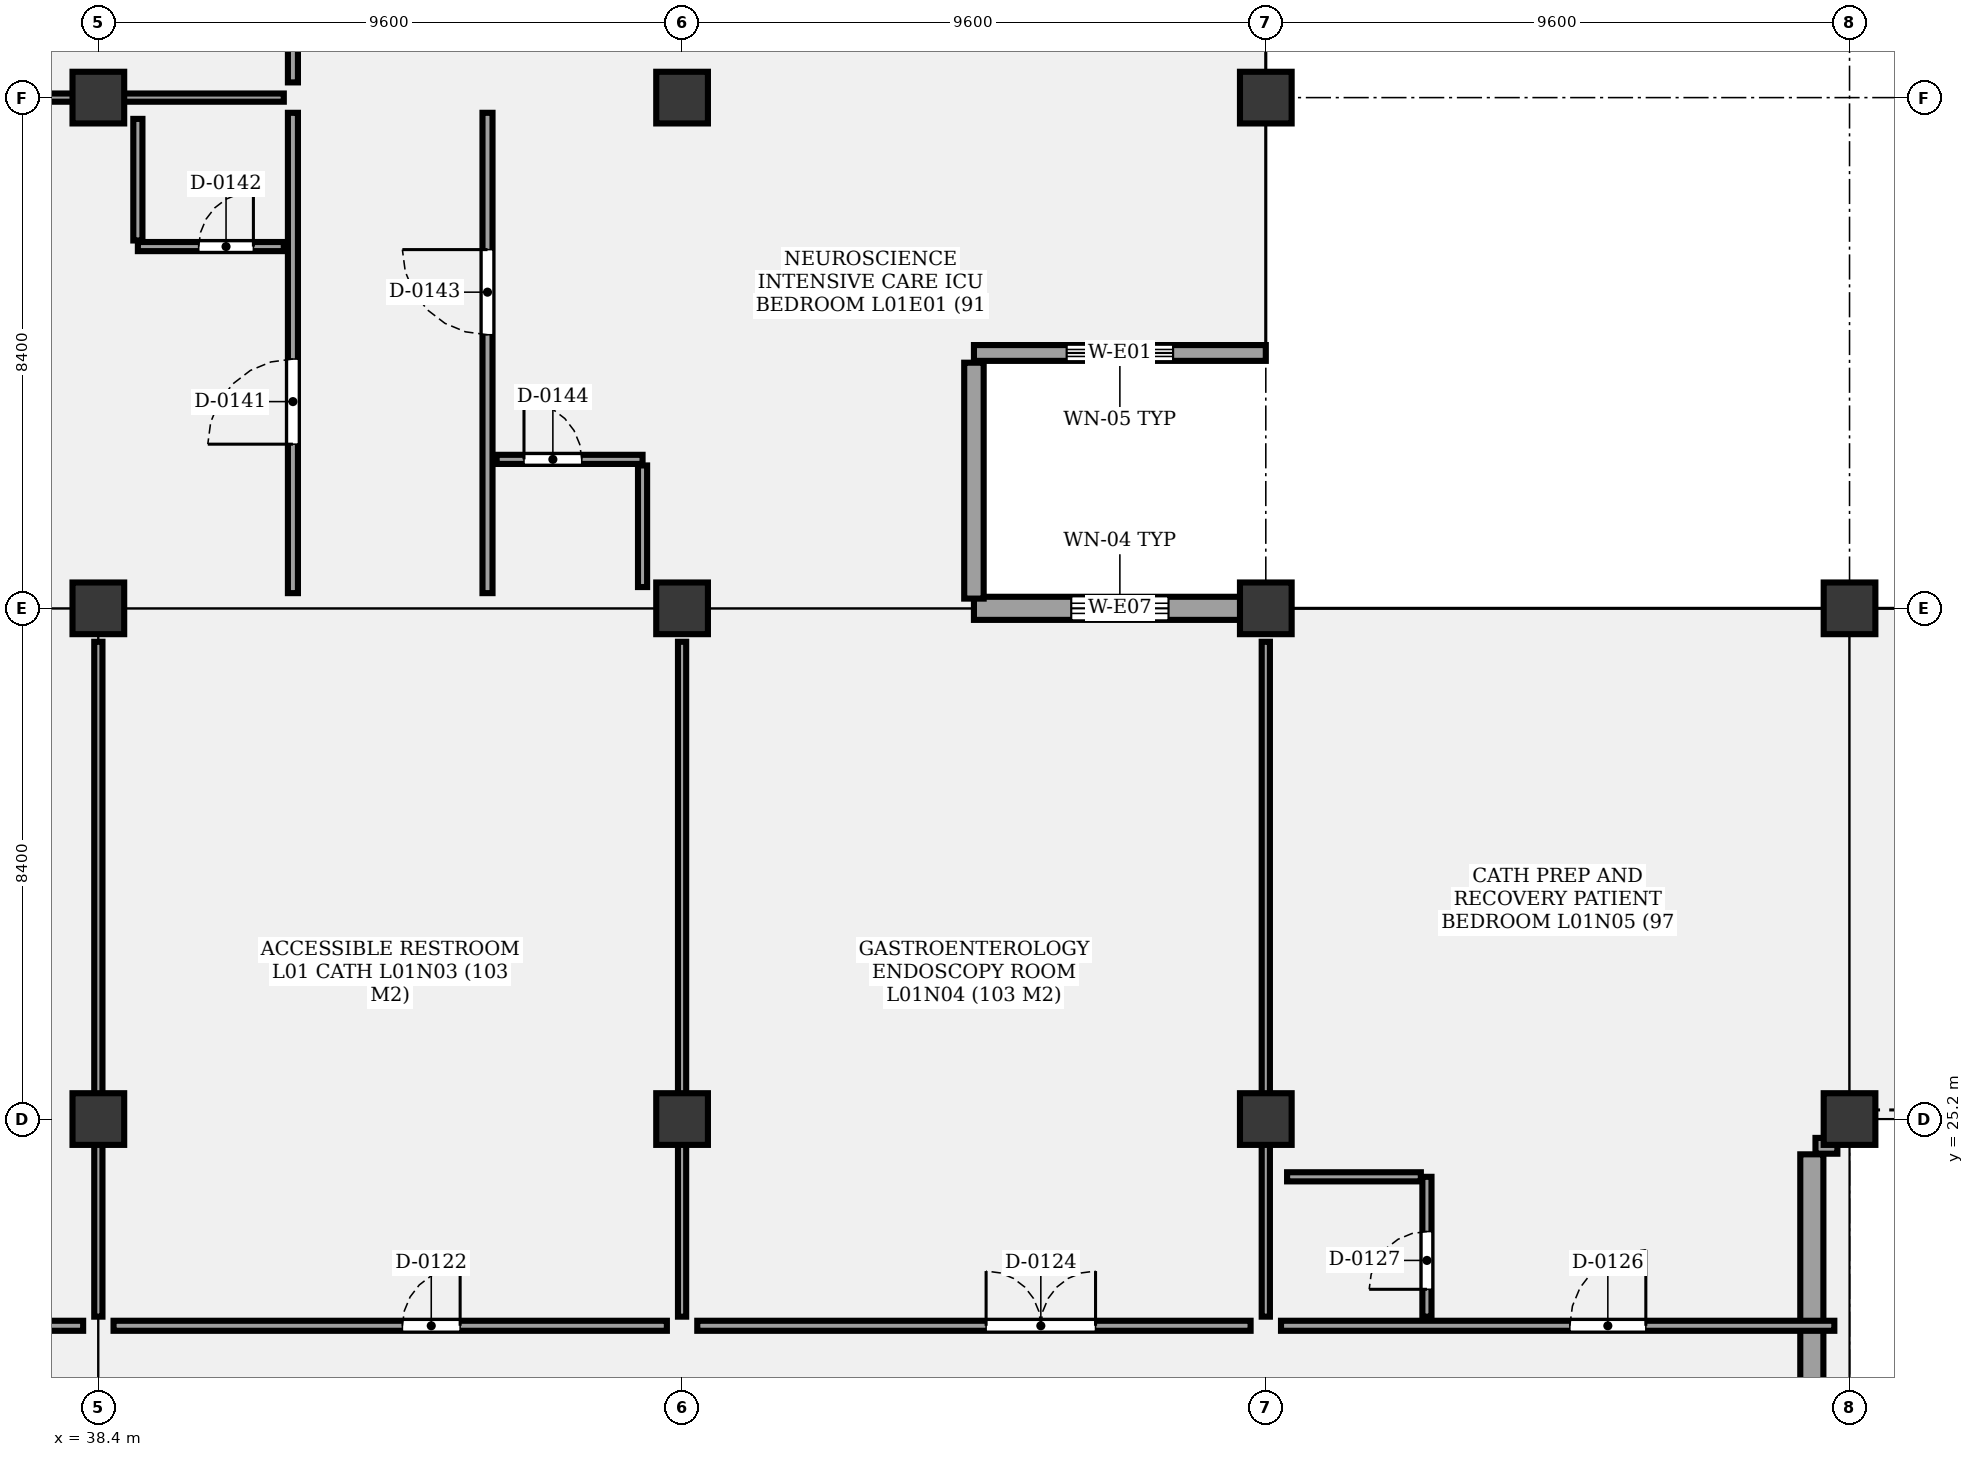
"""IFC4 building model, lengths in metres.
Left out: names, types, materials, properties, quantities, classifications, styles, units other than length and angle.
Written with IfcOpenShell. Run it as: python <this file> out.ifc"""

import sys

from ifc_helpers import new_model, si_unit, direction, frame, frame_2d, origin, origin_2d, place, context, subcontext, project, spatial, rectangle, extrude, element, fill, save


model = new_model("IFC4")
c1 = context("Model", 3, precision=1e-05, world=origin(), true_north=direction((0.0, 1.0)))
c2 = subcontext(c1, "Body", "Model", "MODEL_VIEW")
j1 = project(units=[si_unit("LENGTHUNIT", "METRE"), si_unit("PLANEANGLEUNIT", "RADIAN")], contexts=[c1])
p1 = place(None, origin())
s1 = spatial("IfcSite", under=j1, at=p1, CompositionType="ELEMENT")
p2 = place(p1, origin())
s2 = spatial("IfcBuilding", under=s1, at=p2, CompositionType="ELEMENT")
p3 = place(p2, frame((0.0, 0.0, 5.1)))
s3 = spatial("IfcBuildingStorey", under=s2, at=p3, CompositionType="ELEMENT", Elevation=5.1)
for number, where, z_axis, x_axis in (
    (1, (38.4, 25.2, 0.0), (0.0, 0.0, 1.0), (1.0, 0.0, 0.0)),
    (2, (38.4, 33.6, 0.0), (0.0, 0.0, 1.0), (1.0, 0.0, 0.0)),
    (3, (38.4, 42.0, 0.0), (0.0, 0.0, 1.0), (1.0, 0.0, 0.0)),
    (4, (48.0, 25.2, 0.0), (0.0, 0.0, 1.0), (1.0, 0.0, 0.0)),
    (5, (48.0, 33.6, 0.0), (0.0, 0.0, 1.0), (1.0, 0.0, 0.0)),
    (6, (48.0, 42.0, 0.0), (0.0, 0.0, 1.0), (1.0, 0.0, 0.0)),
    (7, (57.6, 25.2, 0.0), (0.0, 0.0, 1.0), (1.0, 0.0, 0.0)),
    (8, (57.6, 33.6, 0.0), (0.0, 0.0, 1.0), (1.0, 0.0, 0.0)),
    (9, (57.6, 42.0, 0.0), (0.0, 0.0, 1.0), (1.0, 0.0, 0.0)),
    (10, (67.2, 25.2, 0.0), (0.0, 0.0, 1.0), (1.0, 0.0, 0.0)),
    (11, (67.2, 33.6, 0.0), (0.0, 0.0, 1.0), (1.0, 0.0, 0.0)),
):
    element("IfcColumn", number, at=place(p3, frame(where, z_axis=z_axis, x_axis=x_axis)), inside=s3, PredefinedType="COLUMN", context=c2, shape_type="SweptSolid", body=[
        extrude(rectangle(XDim=0.85, YDim=0.85, at=origin_2d()), origin(), (0.0, 0.0, 1.0), 4.8),
    ])
p4 = place(p3, frame((52.8, 33.6, 0.0), z_axis=(0.0, 0.0, 1.0), x_axis=(1.0, 0.0, 0.0)))
e12 = element("IfcWall", 12, at=p4, inside=s3, PredefinedType="SOLIDWALL", context=c2, shape_type="SweptSolid", body=[
    extrude(rectangle(XDim=4.8, YDim=0.38, at=frame_2d((2.4, 0.0))), origin(), (0.0, 0.0, 1.0), 3.94),
])
p5 = place(p4, frame((1.6, 0.0, 0.85)))
e13 = element("IfcOpeningElement", 13, at=p5, cuts=e12, PredefinedType="OPENING", context=c2, shape_type="SweptSolid", body=[
    extrude(rectangle(XDim=1.6, YDim=1.2, at=frame_2d((0.8, 0.6))), frame((0.0, 0.2, 0.0), z_axis=(0.0, -1.0, 0.0), x_axis=(1.0, 0.0, 0.0)), (0.0, 0.0, 1.0), 0.4),
])
p6 = place(p3, frame((57.6, 37.8, 0.0), z_axis=(0.0, 0.0, 1.0), x_axis=(-1.0, 0.0, 0.0)))
e14 = element("IfcWall", 14, at=p6, inside=s3, PredefinedType="SOLIDWALL", context=c2, shape_type="SweptSolid", body=[
    extrude(rectangle(XDim=4.8, YDim=0.26, at=frame_2d((2.4, 0.0))), origin(), (0.0, 0.0, 1.0), 3.94),
])
p7 = place(p6, frame((1.525, 0.0, 0.85)))
e15 = element("IfcOpeningElement", 15, at=p7, cuts=e14, PredefinedType="OPENING", context=c2, shape_type="SweptSolid", body=[
    extrude(rectangle(XDim=1.75, YDim=1.2, at=frame_2d((0.875, 0.6))), frame((0.0, 0.14, 0.0), z_axis=(0.0, -1.0, 0.0), x_axis=(1.0, 0.0, 0.0)), (0.0, 0.0, 1.0), 0.28),
])
p8 = place(p3, frame((52.8, 37.64, 0.0), z_axis=(0.0, 0.0, 1.0), x_axis=(0.0, -1.0, 0.0)))
e16 = element("IfcWall", 16, at=p8, inside=s3, PredefinedType="SOLIDWALL", context=c2, shape_type="SweptSolid", body=[
    extrude(rectangle(XDim=3.88, YDim=0.32, at=frame_2d((1.94, 0.0))), origin(), (0.0, 0.0, 1.0), 3.94),
])
p9 = place(p3, frame((67.0, 24.76, 0.0), z_axis=(0.0, 0.0, 1.0), x_axis=(-1.0, 0.0, 0.0)))
e17 = element("IfcWall", 17, at=p9, inside=s3, PredefinedType="SOLIDWALL", context=c2, shape_type="SweptSolid", body=[
    extrude(rectangle(XDim=0.36, YDim=0.26, at=frame_2d((0.18, 0.0))), origin(), (0.0, 0.0, 1.0), 3.94),
])
p10 = place(p3, frame((66.58, 24.62, 0.0), z_axis=(0.0, 0.0, 1.0), x_axis=(0.0, -1.0, 0.0)))
e18 = element("IfcWall", 18, at=p10, inside=s3, PredefinedType="SOLIDWALL", context=c2, shape_type="SweptSolid", body=[
    extrude(rectangle(XDim=7.4, YDim=0.38, at=frame_2d((3.7, 0.0))), origin(), (0.0, 0.0, 1.0), 3.94),
])
p11 = place(p3, frame((29.05, 21.8, 0.0), z_axis=(0.0, 0.0, 1.0), x_axis=(1.0, 0.0, 0.0)))
e19 = element("IfcWall", 19, at=p11, inside=s3, PredefinedType="PARTITIONING", context=c2, shape_type="SweptSolid", body=[
    extrude(rectangle(XDim=9.1, YDim=0.165, at=frame_2d((4.55, 0.0))), origin(), (0.0, 0.0, 1.0), 3.68),
])
p12 = place(p11, frame((4.75, 0.0, 0.0)))
e20 = element("IfcOpeningElement", 20, at=p12, cuts=e19, PredefinedType="OPENING", context=c2, shape_type="SweptSolid", body=[
    extrude(rectangle(XDim=1.25, YDim=2.2, at=frame_2d((0.625, 1.1))), frame((0.0, 0.093, 0.0), z_axis=(0.0, -1.0, 0.0), x_axis=(1.0, 0.0, 0.0)), (0.0, 0.0, 1.0), 0.185),
])
p13 = place(p3, frame((38.65, 21.8, 0.0), z_axis=(0.0, 0.0, 1.0), x_axis=(1.0, 0.0, 0.0)))
e21 = element("IfcWall", 21, at=p13, inside=s3, PredefinedType="PARTITIONING", context=c2, shape_type="SweptSolid", body=[
    extrude(rectangle(XDim=9.1, YDim=0.165, at=frame_2d((4.55, 0.0))), origin(), (0.0, 0.0, 1.0), 3.68),
])
p14 = place(p13, frame((4.75, 0.0, 0.0)))
e22 = element("IfcOpeningElement", 22, at=p14, cuts=e21, PredefinedType="OPENING", context=c2, shape_type="SweptSolid", body=[
    extrude(rectangle(XDim=0.95, YDim=2.1, at=frame_2d((0.475, 1.05))), frame((0.0, 0.093, 0.0), z_axis=(0.0, -1.0, 0.0), x_axis=(1.0, 0.0, 0.0)), (0.0, 0.0, 1.0), 0.185),
])
p15 = place(p3, frame((38.4, 21.95, 0.0), z_axis=(0.0, 0.0, 1.0), x_axis=(0.0, 1.0, 0.0)))
e23 = element("IfcWall", 23, at=p15, inside=s3, PredefinedType="PARTITIONING", context=c2, shape_type="SweptSolid", body=[
    extrude(rectangle(XDim=11.1, YDim=0.135, at=frame_2d((5.55, 0.0))), origin(), (0.0, 0.0, 1.0), 3.68),
])
p16 = place(p3, frame((48.25, 21.8, 0.0), z_axis=(0.0, 0.0, 1.0), x_axis=(1.0, 0.0, 0.0)))
e24 = element("IfcWall", 24, at=p16, inside=s3, PredefinedType="PARTITIONING", context=c2, shape_type="SweptSolid", body=[
    extrude(rectangle(XDim=9.1, YDim=0.165, at=frame_2d((4.55, 0.0))), origin(), (0.0, 0.0, 1.0), 3.68),
])
p17 = place(p16, frame((4.75, 0.0, 0.0)))
e25 = element("IfcOpeningElement", 25, at=p17, cuts=e24, PredefinedType="OPENING", context=c2, shape_type="SweptSolid", body=[
    extrude(rectangle(XDim=1.8, YDim=2.4, at=frame_2d((0.9, 1.2))), frame((0.0, 0.093, 0.0), z_axis=(0.0, -1.0, 0.0), x_axis=(1.0, 0.0, 0.0)), (0.0, 0.0, 1.0), 0.185),
])
p18 = place(p3, frame((48.0, 21.95, 0.0), z_axis=(0.0, 0.0, 1.0), x_axis=(0.0, 1.0, 0.0)))
e26 = element("IfcWall", 26, at=p18, inside=s3, PredefinedType="PARTITIONING", context=c2, shape_type="SweptSolid", body=[
    extrude(rectangle(XDim=11.1, YDim=0.135, at=frame_2d((5.55, 0.0))), origin(), (0.0, 0.0, 1.0), 3.68),
])
p19 = place(p3, frame((57.85, 21.8, 0.0), z_axis=(0.0, 0.0, 1.0), x_axis=(1.0, 0.0, 0.0)))
e27 = element("IfcWall", 27, at=p19, inside=s3, PredefinedType="PARTITIONING", context=c2, shape_type="SweptSolid", body=[
    extrude(rectangle(XDim=9.1, YDim=0.165, at=frame_2d((4.55, 0.0))), origin(), (0.0, 0.0, 1.0), 3.68),
])
p20 = place(p19, frame((4.75, 0.0, 0.0)))
e28 = element("IfcOpeningElement", 28, at=p20, cuts=e27, PredefinedType="OPENING", context=c2, shape_type="SweptSolid", body=[
    extrude(rectangle(XDim=1.25, YDim=2.2, at=frame_2d((0.625, 1.1))), frame((0.0, 0.093, 0.0), z_axis=(0.0, -1.0, 0.0), x_axis=(1.0, 0.0, 0.0)), (0.0, 0.0, 1.0), 0.185),
])
p21 = place(p3, frame((60.25, 21.95, 0.0), z_axis=(0.0, 0.0, 1.0), x_axis=(0.0, 1.0, 0.0)))
e29 = element("IfcWall", 29, at=p21, inside=s3, PredefinedType="PARTITIONING", context=c2, shape_type="SweptSolid", body=[
    extrude(rectangle(XDim=2.3, YDim=0.15, at=frame_2d((1.15, 0.0))), origin(), (0.0, 0.0, 1.0), 3.68),
])
p22 = place(p21, frame((0.45, 0.0, 0.0)))
e30 = element("IfcOpeningElement", 30, at=p22, cuts=e29, PredefinedType="OPENING", context=c2, shape_type="SweptSolid", body=[
    extrude(rectangle(XDim=0.95, YDim=2.1, at=frame_2d((0.475, 1.05))), frame((0.0, 0.085, 0.0), z_axis=(0.0, -1.0, 0.0), x_axis=(1.0, 0.0, 0.0)), (0.0, 0.0, 1.0), 0.17),
])
p23 = place(p3, frame((57.95, 24.25, 0.0), z_axis=(0.0, 0.0, 1.0), x_axis=(1.0, 0.0, 0.0)))
e31 = element("IfcWall", 31, at=p23, inside=s3, PredefinedType="PARTITIONING", context=c2, shape_type="SweptSolid", body=[
    extrude(rectangle(XDim=2.2, YDim=0.15, at=frame_2d((1.1, 0.0))), origin(), (0.0, 0.0, 1.0), 3.68),
])
p24 = place(p3, frame((57.6, 21.95, 0.0), z_axis=(0.0, 0.0, 1.0), x_axis=(0.0, 1.0, 0.0)))
e32 = element("IfcWall", 32, at=p24, inside=s3, PredefinedType="PARTITIONING", context=c2, shape_type="SweptSolid", body=[
    extrude(rectangle(XDim=11.1, YDim=0.135, at=frame_2d((5.55, 0.0))), origin(), (0.0, 0.0, 1.0), 3.68),
])
p25 = place(p3, frame((41.6, 33.85, 0.0), z_axis=(0.0, 0.0, 1.0), x_axis=(0.0, 1.0, 0.0)))
e33 = element("IfcWall", 33, at=p25, inside=s3, PredefinedType="PARTITIONING", context=c2, shape_type="SweptSolid", body=[
    extrude(rectangle(XDim=7.9, YDim=0.165, at=frame_2d((3.95, 0.0))), origin(), (0.0, 0.0, 1.0), 3.68),
])
p26 = place(p25, frame((2.45, 0.0, 0.0)))
e34 = element("IfcOpeningElement", 34, at=p26, cuts=e33, PredefinedType="OPENING", context=c2, shape_type="SweptSolid", body=[
    extrude(rectangle(XDim=1.4, YDim=2.4, at=frame_2d((0.7, 1.2))), frame((0.0, 0.093, 0.0), z_axis=(0.0, -1.0, 0.0), x_axis=(1.0, 0.0, 0.0)), (0.0, 0.0, 1.0), 0.185),
])
p27 = place(p3, frame((39.05, 39.55, 0.0), z_axis=(0.0, 0.0, 1.0), x_axis=(1.0, 0.0, 0.0)))
e35 = element("IfcWall", 35, at=p27, inside=s3, PredefinedType="PARTITIONING", context=c2, shape_type="SweptSolid", body=[
    extrude(rectangle(XDim=2.4, YDim=0.15, at=frame_2d((1.2, 0.0))), origin(), (0.0, 0.0, 1.0), 3.68),
])
p28 = place(p27, frame((1.0, 0.0, 0.0)))
e36 = element("IfcOpeningElement", 36, at=p28, cuts=e35, PredefinedType="OPENING", context=c2, shape_type="SweptSolid", body=[
    extrude(rectangle(XDim=0.9, YDim=2.1, at=frame_2d((0.45, 1.05))), frame((0.0, 0.085, 0.0), z_axis=(0.0, -1.0, 0.0), x_axis=(1.0, 0.0, 0.0)), (0.0, 0.0, 1.0), 0.17),
])
p29 = place(p3, frame((39.05, 39.65, 0.0), z_axis=(0.0, 0.0, 1.0), x_axis=(0.0, 1.0, 0.0)))
e37 = element("IfcWall", 37, at=p29, inside=s3, PredefinedType="PARTITIONING", context=c2, shape_type="SweptSolid", body=[
    extrude(rectangle(XDim=2.0, YDim=0.15, at=frame_2d((1.0, 0.0))), origin(), (0.0, 0.0, 1.0), 3.68),
])
p30 = place(p3, frame((44.8, 33.85, 0.0), z_axis=(0.0, 0.0, 1.0), x_axis=(0.0, 1.0, 0.0)))
e38 = element("IfcWall", 38, at=p30, inside=s3, PredefinedType="PARTITIONING", context=c2, shape_type="SweptSolid", body=[
    extrude(rectangle(XDim=7.9, YDim=0.165, at=frame_2d((3.95, 0.0))), origin(), (0.0, 0.0, 1.0), 3.68),
])
p31 = place(p30, frame((4.25, 0.0, 0.0)))
e39 = element("IfcOpeningElement", 39, at=p31, cuts=e38, PredefinedType="OPENING", context=c2, shape_type="SweptSolid", body=[
    extrude(rectangle(XDim=1.4, YDim=2.4, at=frame_2d((0.7, 1.2))), frame((0.0, 0.093, 0.0), z_axis=(0.0, -1.0, 0.0), x_axis=(1.0, 0.0, 0.0)), (0.0, 0.0, 1.0), 0.185),
])
p32 = place(p3, frame((44.95, 36.05, 0.0), z_axis=(0.0, 0.0, 1.0), x_axis=(1.0, 0.0, 0.0)))
e40 = element("IfcWall", 40, at=p32, inside=s3, PredefinedType="PARTITIONING", context=c2, shape_type="SweptSolid", body=[
    extrude(rectangle(XDim=2.4, YDim=0.15, at=frame_2d((1.2, 0.0))), origin(), (0.0, 0.0, 1.0), 3.68),
])
p33 = place(p32, frame((0.45, 0.0, 0.0)))
e41 = element("IfcOpeningElement", 41, at=p33, cuts=e40, PredefinedType="OPENING", context=c2, shape_type="SweptSolid", body=[
    extrude(rectangle(XDim=0.95, YDim=2.1, at=frame_2d((0.475, 1.05))), frame((0.0, 0.085, 0.0), z_axis=(0.0, -1.0, 0.0), x_axis=(1.0, 0.0, 0.0)), (0.0, 0.0, 1.0), 0.17),
])
p34 = place(p3, frame((47.35, 33.95, 0.0), z_axis=(0.0, 0.0, 1.0), x_axis=(0.0, 1.0, 0.0)))
e42 = element("IfcWall", 42, at=p34, inside=s3, PredefinedType="PARTITIONING", context=c2, shape_type="SweptSolid", body=[
    extrude(rectangle(XDim=2.0, YDim=0.15, at=frame_2d((1.0, 0.0))), origin(), (0.0, 0.0, 1.0), 3.68),
])
p35 = place(p3, frame((41.6, 42.25, 0.0), z_axis=(0.0, 0.0, 1.0), x_axis=(0.0, 1.0, 0.0)))
e43 = element("IfcWall", 43, at=p35, inside=s3, PredefinedType="PARTITIONING", context=c2, shape_type="SweptSolid", body=[
    extrude(rectangle(XDim=7.9, YDim=0.165, at=frame_2d((3.95, 0.0))), origin(), (0.0, 0.0, 1.0), 3.68),
])
p36 = place(p35, frame((2.45, 0.0, 0.0)))
e44 = element("IfcOpeningElement", 44, at=p36, cuts=e43, PredefinedType="OPENING", context=c2, shape_type="SweptSolid", body=[
    extrude(rectangle(XDim=1.2, YDim=2.4, at=frame_2d((0.6, 1.2))), frame((0.0, 0.093, 0.0), z_axis=(0.0, -1.0, 0.0), x_axis=(1.0, 0.0, 0.0)), (0.0, 0.0, 1.0), 0.185),
])
p37 = place(p3, frame((29.35, 42.0, 0.0), z_axis=(0.0, 0.0, 1.0), x_axis=(1.0, 0.0, 0.0)))
e45 = element("IfcWall", 45, at=p37, inside=s3, PredefinedType="PARTITIONING", context=c2, shape_type="SweptSolid", body=[
    extrude(rectangle(XDim=12.1, YDim=0.135, at=frame_2d((6.05, 0.0))), origin(), (0.0, 0.0, 1.0), 3.68),
])
p38 = place(p5, origin())
e46 = element("IfcWindow", 46, at=p38, inside=s3, PartitioningType="SINGLE_PANEL", PredefinedType="WINDOW", context=c2, shape_type="SweptSolid", body=[
    extrude(rectangle(XDim=1.6, YDim=1.2, at=frame_2d((0.8, 0.6))), frame((0.0, 0.03, 0.0), z_axis=(0.0, -1.0, 0.0), x_axis=(1.0, 0.0, 0.0)), (0.0, 0.0, 1.0), 0.06),
])
fill(e13, e46)
p39 = place(p7, origin())
e47 = element("IfcWindow", 47, at=p39, inside=s3, PartitioningType="SINGLE_PANEL", PredefinedType="WINDOW", context=c2, shape_type="SweptSolid", body=[
    extrude(rectangle(XDim=1.75, YDim=1.2, at=frame_2d((0.875, 0.6))), frame((0.0, 0.03, 0.0), z_axis=(0.0, -1.0, 0.0), x_axis=(1.0, 0.0, 0.0)), (0.0, 0.0, 1.0), 0.06),
])
fill(e15, e47)
p40 = place(p14, origin())
e48 = element("IfcDoor", 48, at=p40, inside=s3, OperationType="SINGLE_SWING_RIGHT", PredefinedType="DOOR", context=c2, shape_type="SweptSolid", body=[
    extrude(rectangle(XDim=0.95, YDim=2.1, at=frame_2d((0.475, 1.05))), frame((0.0, 0.025, 0.0), z_axis=(0.0, -1.0, 0.0), x_axis=(1.0, 0.0, 0.0)), (0.0, 0.0, 1.0), 0.05),
])
fill(e22, e48)
p41 = place(p17, origin())
e49 = element("IfcDoor", 49, at=p41, inside=s3, OperationType="DOUBLE_DOOR_SINGLE_SWING", PredefinedType="DOOR", context=c2, shape_type="SweptSolid", body=[
    extrude(rectangle(XDim=1.8, YDim=2.4, at=frame_2d((0.9, 1.2))), frame((0.0, 0.025, 0.0), z_axis=(0.0, -1.0, 0.0), x_axis=(1.0, 0.0, 0.0)), (0.0, 0.0, 1.0), 0.05),
])
fill(e25, e49)
p42 = place(p20, origin())
e50 = element("IfcDoor", 50, at=p42, inside=s3, OperationType="SINGLE_SWING_RIGHT", PredefinedType="DOOR", context=c2, shape_type="SweptSolid", body=[
    extrude(rectangle(XDim=1.25, YDim=2.2, at=frame_2d((0.625, 1.1))), frame((0.0, 0.025, 0.0), z_axis=(0.0, -1.0, 0.0), x_axis=(1.0, 0.0, 0.0)), (0.0, 0.0, 1.0), 0.05),
])
fill(e28, e50)
p43 = place(p22, origin())
e51 = element("IfcDoor", 51, at=p43, inside=s3, OperationType="SINGLE_SWING_LEFT", PredefinedType="DOOR", context=c2, shape_type="SweptSolid", body=[
    extrude(rectangle(XDim=0.95, YDim=2.1, at=frame_2d((0.475, 1.05))), frame((0.0, 0.025, 0.0), z_axis=(0.0, -1.0, 0.0), x_axis=(1.0, 0.0, 0.0)), (0.0, 0.0, 1.0), 0.05),
])
fill(e30, e51)
p44 = place(p26, origin())
e52 = element("IfcDoor", 52, at=p44, inside=s3, OperationType="SINGLE_SWING_LEFT", PredefinedType="DOOR", context=c2, shape_type="SweptSolid", body=[
    extrude(rectangle(XDim=1.4, YDim=2.4, at=frame_2d((0.7, 1.2))), frame((0.0, 0.025, 0.0), z_axis=(0.0, -1.0, 0.0), x_axis=(1.0, 0.0, 0.0)), (0.0, 0.0, 1.0), 0.05),
])
fill(e34, e52)
p45 = place(p28, origin())
e53 = element("IfcDoor", 53, at=p45, inside=s3, OperationType="SINGLE_SWING_RIGHT", PredefinedType="DOOR", context=c2, shape_type="SweptSolid", body=[
    extrude(rectangle(XDim=0.9, YDim=2.1, at=frame_2d((0.45, 1.05))), frame((0.0, 0.025, 0.0), z_axis=(0.0, -1.0, 0.0), x_axis=(1.0, 0.0, 0.0)), (0.0, 0.0, 1.0), 0.05),
])
fill(e36, e53)
p46 = place(p31, origin())
e54 = element("IfcDoor", 54, at=p46, inside=s3, OperationType="SINGLE_SWING_RIGHT", PredefinedType="DOOR", context=c2, shape_type="SweptSolid", body=[
    extrude(rectangle(XDim=1.4, YDim=2.4, at=frame_2d((0.7, 1.2))), frame((0.0, 0.025, 0.0), z_axis=(0.0, -1.0, 0.0), x_axis=(1.0, 0.0, 0.0)), (0.0, 0.0, 1.0), 0.05),
])
fill(e39, e54)
p47 = place(p33, origin())
e55 = element("IfcDoor", 55, at=p47, inside=s3, OperationType="SINGLE_SWING_LEFT", PredefinedType="DOOR", context=c2, shape_type="SweptSolid", body=[
    extrude(rectangle(XDim=0.95, YDim=2.1, at=frame_2d((0.475, 1.05))), frame((0.0, 0.025, 0.0), z_axis=(0.0, -1.0, 0.0), x_axis=(1.0, 0.0, 0.0)), (0.0, 0.0, 1.0), 0.05),
])
fill(e41, e55)
save(model, sys.argv[1])
